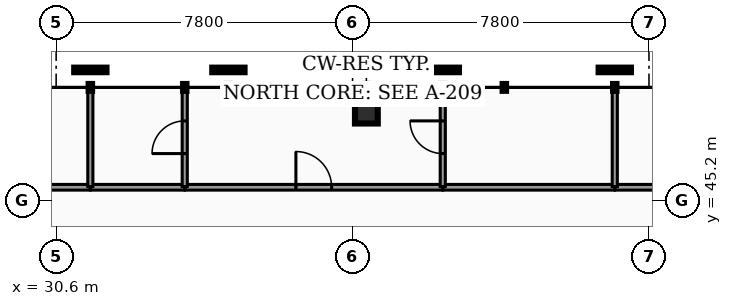
"""IFC4 building model, lengths in metres.
Left out: names, types, materials, properties, quantities, classifications, styles, units other than length and angle.
Written with IfcOpenShell. Run it as: python <this file> out.ifc"""

import sys

from ifc_helpers import new_model, si_unit, direction, frame, frame_2d, origin, origin_2d, place, context, subcontext, project, spatial, rectangle, hollow_rectangle, extrude, element, fill, save


model = new_model("IFC4")
c1 = context("Model", 3, precision=1e-05, world=origin(), true_north=direction((0.0, 1.0)))
c2 = subcontext(c1, "Body", "Model", "MODEL_VIEW")
j1 = project(units=[si_unit("LENGTHUNIT", "METRE"), si_unit("PLANEANGLEUNIT", "RADIAN")], contexts=[c1])
p1 = place(None, origin())
s1 = spatial("IfcSite", under=j1, at=p1, CompositionType="ELEMENT")
p2 = place(p1, origin())
s2 = spatial("IfcBuilding", under=s1, at=p2, CompositionType="ELEMENT")
p3 = place(p2, frame((0.0, 0.0, 232.56)))
s3 = spatial("IfcBuildingStorey", under=s2, at=p3, CompositionType="ELEMENT", Elevation=232.56)
p4 = place(p3, frame((38.763, 47.528, 0.0), z_axis=(0.0, 0.0, 1.0), x_axis=(1.0, 0.0, 0.0)))
e1 = element("IfcColumn", 1, at=p4, inside=s3, PredefinedType="COLUMN", context=c2, shape_type="SweptSolid", body=[
    extrude(hollow_rectangle(XDim=0.6, YDim=0.6, WallThickness=0.03, at=origin_2d()), origin(), (0.0, 0.0, 1.0), 3.18),
])
p5 = place(p3, frame((28.55, 45.55, 0.0), z_axis=(0.0, 0.0, 1.0), x_axis=(1.0, 0.0, 0.0)))
e2 = element("IfcWall", 2, at=p5, inside=s3, PredefinedType="PARTITIONING", context=c2, shape_type="SweptSolid", body=[
    extrude(rectangle(XDim=2.945, YDim=0.15, at=frame_2d((1.473, 0.0))), origin(), (0.0, 0.0, 1.0), 2.235),
])
p6 = place(p3, frame((45.305, 45.55, 0.0), z_axis=(0.0, 0.0, 1.0), x_axis=(1.0, 0.0, 0.0)))
e3 = element("IfcWall", 3, at=p6, inside=s3, PredefinedType="PARTITIONING", context=c2, shape_type="SweptSolid", body=[
    extrude(rectangle(XDim=3.045, YDim=0.15, at=frame_2d((1.522, 0.0))), origin(), (0.0, 0.0, 1.0), 2.235),
])
p7 = place(p3, frame((33.989, 45.55, 0.0), z_axis=(0.0, 0.0, 1.0), x_axis=(1.0, 0.0, 0.0)))
e4 = element("IfcWall", 4, at=p7, inside=s3, PredefinedType="PARTITIONING", context=c2, shape_type="SweptSolid", body=[
    extrude(rectangle(XDim=6.78, YDim=0.15, at=frame_2d((3.39, 0.0))), origin(), (0.0, 0.0, 1.0), 2.235),
])
p8 = place(p7, frame((2.92, 0.0, 0.0)))
e5 = element("IfcOpeningElement", 5, at=p8, cuts=e4, PredefinedType="OPENING", context=c2, shape_type="SweptSolid", body=[
    extrude(rectangle(XDim=0.94, YDim=2.05, at=frame_2d((0.47, 1.025))), frame((0.0, 0.085, 0.0), z_axis=(0.0, -1.0, 0.0), x_axis=(1.0, 0.0, 0.0)), (0.0, 0.0, 1.0), 0.17),
])
p9 = place(p3, frame((40.779, 45.55, 0.0), z_axis=(0.0, 0.0, 1.0), x_axis=(1.0, 0.0, 0.0)))
e6 = element("IfcWall", 6, at=p9, inside=s3, PredefinedType="PARTITIONING", context=c2, shape_type="SweptSolid", body=[
    extrude(rectangle(XDim=4.516, YDim=0.15, at=frame_2d((2.258, 0.0))), origin(), (0.0, 0.0, 1.0), 2.235),
])
p10 = place(p3, frame((31.505, 45.55, 0.0), z_axis=(0.0, 0.0, 1.0), x_axis=(1.0, 0.0, 0.0)))
e7 = element("IfcWall", 7, at=p10, inside=s3, PredefinedType="PARTITIONING", context=c2, shape_type="SweptSolid", body=[
    extrude(rectangle(XDim=2.474, YDim=0.15, at=frame_2d((1.237, 0.0))), origin(), (0.0, 0.0, 1.0), 2.235),
])
for number, where, z_axis, x_axis in (
    (8, (31.5, 45.57, 0.0), (0.0, 0.0, 1.0), (0.0, 1.0, 0.0)),
    (9, (45.3, 45.57, 0.0), (0.0, 0.0, 1.0), (0.0, 1.0, 0.0)),
):
    element("IfcWall", number, at=place(p3, frame(where, z_axis=z_axis, x_axis=x_axis)), inside=s3, PredefinedType="PARTITIONING", context=c2, shape_type="SweptSolid", body=[
        extrude(rectangle(XDim=2.593, YDim=0.135, at=frame_2d((1.296, 0.0))), origin(), (0.0, 0.0, 1.0), 2.235),
    ])
p11 = place(p3, frame((40.774, 45.57, 0.0), z_axis=(0.0, 0.0, 1.0), x_axis=(0.0, 1.0, 0.0)))
e10 = element("IfcWall", 10, at=p11, inside=s3, PredefinedType="PARTITIONING", context=c2, shape_type="SweptSolid", body=[
    extrude(rectangle(XDim=2.593, YDim=0.135, at=frame_2d((1.296, 0.0))), origin(), (0.0, 0.0, 1.0), 2.235),
])
p12 = place(p11, frame((0.866, 0.0, 0.0)))
e11 = element("IfcOpeningElement", 11, at=p12, cuts=e10, PredefinedType="OPENING", context=c2, shape_type="SweptSolid", body=[
    extrude(rectangle(XDim=0.86, YDim=2.05, at=frame_2d((0.43, 1.025))), frame((0.0, 0.077, 0.0), z_axis=(0.0, -1.0, 0.0), x_axis=(1.0, 0.0, 0.0)), (0.0, 0.0, 1.0), 0.155),
])
p13 = place(p3, frame((33.984, 45.57, 0.0), z_axis=(0.0, 0.0, 1.0), x_axis=(0.0, 1.0, 0.0)))
e12 = element("IfcWall", 12, at=p13, inside=s3, PredefinedType="PARTITIONING", context=c2, shape_type="SweptSolid", body=[
    extrude(rectangle(XDim=2.593, YDim=0.135, at=frame_2d((1.296, 0.0))), origin(), (0.0, 0.0, 1.0), 2.235),
])
p14 = place(p13, frame((0.866, 0.0, 0.0)))
e13 = element("IfcOpeningElement", 13, at=p14, cuts=e12, PredefinedType="OPENING", context=c2, shape_type="SweptSolid", body=[
    extrude(rectangle(XDim=0.86, YDim=2.05, at=frame_2d((0.43, 1.025))), frame((0.0, 0.077, 0.0), z_axis=(0.0, -1.0, 0.0), x_axis=(1.0, 0.0, 0.0)), (0.0, 0.0, 1.0), 0.155),
])
p15 = place(p8, origin())
e14 = element("IfcDoor", 14, at=p15, inside=s3, OperationType="SINGLE_SWING_LEFT", PredefinedType="DOOR", context=c2, shape_type="SweptSolid", body=[
    extrude(rectangle(XDim=0.94, YDim=2.05, at=frame_2d((0.47, 1.025))), frame((0.0, 0.025, 0.0), z_axis=(0.0, -1.0, 0.0), x_axis=(1.0, 0.0, 0.0)), (0.0, 0.0, 1.0), 0.05),
])
fill(e5, e14)
p16 = place(p12, origin())
e15 = element("IfcDoor", 15, at=p16, inside=s3, OperationType="SINGLE_SWING_RIGHT", PredefinedType="DOOR", context=c2, shape_type="SweptSolid", body=[
    extrude(rectangle(XDim=0.86, YDim=2.05, at=frame_2d((0.43, 1.025))), frame((0.0, 0.025, 0.0), z_axis=(0.0, -1.0, 0.0), x_axis=(1.0, 0.0, 0.0)), (0.0, 0.0, 1.0), 0.05),
])
fill(e11, e15)
p17 = place(p14, origin())
e16 = element("IfcDoor", 16, at=p17, inside=s3, OperationType="SINGLE_SWING_LEFT", PredefinedType="DOOR", context=c2, shape_type="SweptSolid", body=[
    extrude(rectangle(XDim=0.86, YDim=2.05, at=frame_2d((0.43, 1.025))), frame((0.0, 0.025, 0.0), z_axis=(0.0, -1.0, 0.0), x_axis=(1.0, 0.0, 0.0)), (0.0, 0.0, 1.0), 0.05),
])
fill(e13, e16)
save(model, sys.argv[1])
